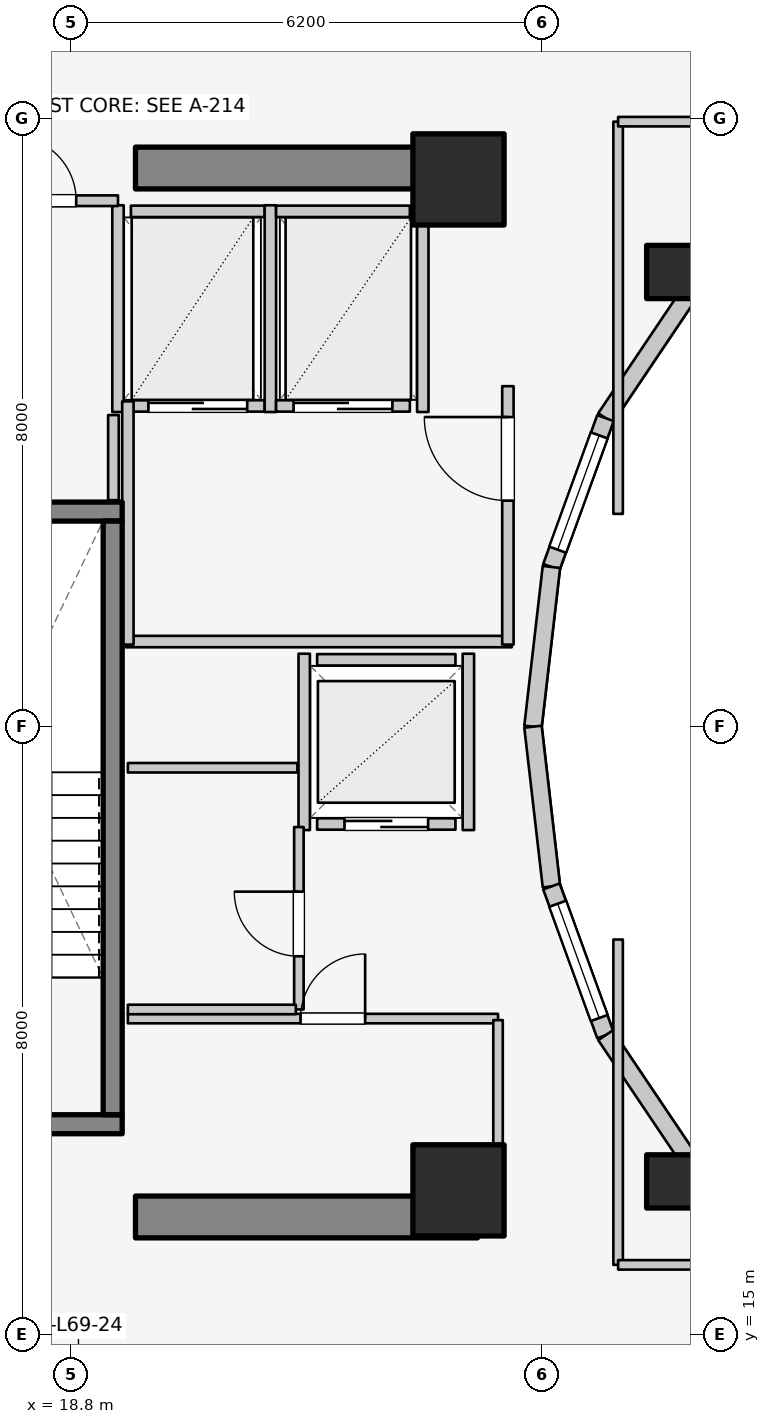
"""IFC4 building model, lengths in metres.
Left out: names, types, materials, properties, quantities, classifications, styles, units other than length and angle.
Written with IfcOpenShell. Run it as: python <this file> out.ifc"""

import sys

from ifc_helpers import new_model, si_unit, direction, frame, frame_2d, origin, origin_2d, place, context, subcontext, project, spatial, rectangle, extrude, element, fill, save


model = new_model("IFC4")
c1 = context("Model", 3, precision=1e-05, world=origin(), true_north=direction((0.0, 1.0)))
c2 = subcontext(c1, "Body", "Model", "MODEL_VIEW")
j1 = project(units=[si_unit("LENGTHUNIT", "METRE"), si_unit("PLANEANGLEUNIT", "RADIAN")], contexts=[c1])
p1 = place(None, origin())
s1 = spatial("IfcSite", under=j1, at=p1, CompositionType="ELEMENT")
p2 = place(p1, origin())
s2 = spatial("IfcBuilding", under=s1, at=p2, CompositionType="ELEMENT")
p3 = place(p2, frame((0.0, 0.0, 226.4)))
s3 = spatial("IfcBuildingStorey", under=s2, at=p3, CompositionType="ELEMENT", Elevation=226.4)
for number, where, z_axis, x_axis in (
    (1, (19.65, 16.55, 0.0), (0.0, 0.0, 1.0), (1.0, 0.0, 0.0)),
    (2, (19.65, 30.35, 0.0), (0.0, 0.0, 1.0), (1.0, 0.0, 0.0)),
):
    element("IfcWall", number, at=place(p3, frame(where, z_axis=z_axis, x_axis=x_axis)), inside=s3, PredefinedType="SHEAR", context=c2, shape_type="SweptSolid", body=[
        extrude(rectangle(XDim=4.5, YDim=0.55, at=frame_2d((2.25, 0.0))), origin(), (0.0, 0.0, 1.0), 3.1),
    ])
p4 = place(p3, frame((16.105, 17.77, 0.0), z_axis=(0.0, 0.0, 1.0), x_axis=(1.0, 0.0, 0.0)))
e3 = element("IfcWall", 3, at=p4, inside=s3, PredefinedType="SOLIDWALL", context=c2, shape_type="SweptSolid", body=[
    extrude(rectangle(XDim=3.37, YDim=0.25, at=frame_2d((1.685, 0.0))), origin(), (0.0, 0.0, 1.0), 3.1),
])
p5 = place(p4, frame((1.135, 0.0, 0.0)))
e4 = element("IfcOpeningElement", 4, at=p5, cuts=e3, PredefinedType="OPENING", context=c2, shape_type="SweptSolid", body=[
    extrude(rectangle(XDim=1.1, YDim=2.1, at=frame_2d((0.55, 1.05))), frame((0.0, 0.135, 0.0), z_axis=(0.0, -1.0, 0.0), x_axis=(1.0, 0.0, 0.0)), (0.0, 0.0, 1.0), 0.27),
])
p6 = place(p3, frame((16.105, 25.83, 0.0), z_axis=(0.0, 0.0, 1.0), x_axis=(1.0, 0.0, 0.0)))
e5 = element("IfcWall", 5, at=p6, inside=s3, PredefinedType="SOLIDWALL", context=c2, shape_type="SweptSolid", body=[
    extrude(rectangle(XDim=3.37, YDim=0.25, at=frame_2d((1.685, 0.0))), origin(), (0.0, 0.0, 1.0), 3.1),
])
p7 = place(p3, frame((19.35, 17.895, 0.0), z_axis=(0.0, 0.0, 1.0), x_axis=(0.0, 1.0, 0.0)))
e6 = element("IfcWall", 6, at=p7, inside=s3, PredefinedType="SOLIDWALL", context=c2, shape_type="SweptSolid", body=[
    extrude(rectangle(XDim=7.81, YDim=0.25, at=frame_2d((3.905, 0.0))), origin(), (0.0, 0.0, 1.0), 3.1),
])
for number, where, z_axis, x_axis in (
    (7, (23.9, 16.9, 0.0), (0.0, 0.0, 1.0), (1.0, 0.0, 0.0)),
    (8, (23.9, 30.2, 0.0), (0.0, 0.0, 1.0), (1.0, 0.0, 0.0)),
):
    element("IfcColumn", number, at=place(p3, frame(where, z_axis=z_axis, x_axis=x_axis)), inside=s3, PredefinedType="COLUMN", context=c2, shape_type="SweptSolid", body=[
        extrude(rectangle(XDim=1.2, YDim=1.2, at=origin_2d()), origin(), (0.0, 0.0, 1.0), 3.1),
    ])
for number, where, z_axis, x_axis in (
    (9, (26.725, 28.982, 0.0), (0.0, 0.0, 1.0), (1.0, 0.0, 0.0)),
    (10, (26.725, 17.018, 0.0), (0.0, 0.0, 1.0), (1.0, 0.0, 0.0)),
):
    element("IfcColumn", number, at=place(p3, frame(where, z_axis=z_axis, x_axis=x_axis)), inside=s3, PredefinedType="COLUMN", context=c2, shape_type="SweptSolid", body=[
        extrude(rectangle(XDim=0.7, YDim=0.7, at=origin_2d()), origin(), (0.0, 0.0, 1.0), 3.1),
    ])
p8 = place(p3, frame((28.44, 30.032, 0.0), z_axis=(0.0, 0.0, 1.0), x_axis=(-0.752576694707, -0.658504607869, 0.0)))
e11 = element("IfcWall", 11, at=p8, inside=s3, PredefinedType="STANDARD", context=c2, shape_type="SweptSolid", body=[
    extrude(rectangle(XDim=1.959, YDim=0.23, at=frame_2d((0.98, 0.0))), origin(), (0.0, 0.0, 1.0), 2.16),
])
p9 = place(p3, frame((26.965, 28.742, 0.0), z_axis=(0.0, 0.0, 1.0), x_axis=(-0.558197800898, -0.829707909492, 0.0)))
e12 = element("IfcWall", 12, at=p9, inside=s3, PredefinedType="STANDARD", context=c2, shape_type="SweptSolid", body=[
    extrude(rectangle(XDim=2.027, YDim=0.23, at=frame_2d((1.013, 0.0))), origin(), (0.0, 0.0, 1.0), 2.16),
])
p10 = place(p3, frame((25.834, 27.06, 0.0), z_axis=(0.0, 0.0, 1.0), x_axis=(-0.341423187295, -0.93990968033, 0.0)))
e13 = element("IfcWall", 13, at=p10, inside=s3, PredefinedType="STANDARD", context=c2, shape_type="SweptSolid", body=[
    extrude(rectangle(XDim=2.084, YDim=0.23, at=frame_2d((1.042, 0.0))), origin(), (0.0, 0.0, 1.0), 2.84),
])
p11 = place(p10, frame((0.242, 0.0, 0.85)))
e14 = element("IfcOpeningElement", 14, at=p11, cuts=e13, PredefinedType="OPENING", context=c2, shape_type="SweptSolid", body=[
    extrude(rectangle(XDim=1.6, YDim=1.65, at=frame_2d((0.8, 0.825))), frame((0.0, 0.125, 0.0), z_axis=(0.0, -1.0, 0.0), x_axis=(1.0, 0.0, 0.0)), (0.0, 0.0, 1.0), 0.25),
])
for number, where, z_axis, x_axis in (
    (15, (25.123, 25.102, 0.0), (0.0, 0.0, 1.0), (-0.115, -0.993, 0.0)),
    (16, (24.88, 23.0, 0.0), (0.0, 0.0, 1.0), (0.115, -0.993, 0.0)),
):
    element("IfcWall", number, at=place(p3, frame(where, z_axis=z_axis, x_axis=x_axis)), inside=s3, PredefinedType="STANDARD", context=c2, shape_type="SweptSolid", body=[
        extrude(rectangle(XDim=2.115, YDim=0.23, at=frame_2d((1.058, 0.0))), origin(), (0.0, 0.0, 1.0), 2.84),
    ])
p12 = place(p3, frame((25.123, 20.898, 0.0), z_axis=(0.0, 0.0, 1.0), x_axis=(0.341423187295, -0.93990968033, 0.0)))
e17 = element("IfcWall", 17, at=p12, inside=s3, PredefinedType="STANDARD", context=c2, shape_type="SweptSolid", body=[
    extrude(rectangle(XDim=2.084, YDim=0.23, at=frame_2d((1.042, 0.0))), origin(), (0.0, 0.0, 1.0), 2.84),
])
p13 = place(p12, frame((0.242, 0.0, 0.85)))
e18 = element("IfcOpeningElement", 18, at=p13, cuts=e17, PredefinedType="OPENING", context=c2, shape_type="SweptSolid", body=[
    extrude(rectangle(XDim=1.6, YDim=1.65, at=frame_2d((0.8, 0.825))), frame((0.0, 0.125, 0.0), z_axis=(0.0, -1.0, 0.0), x_axis=(1.0, 0.0, 0.0)), (0.0, 0.0, 1.0), 0.25),
])
p14 = place(p3, frame((25.834, 18.94, 0.0), z_axis=(0.0, 0.0, 1.0), x_axis=(0.558197800898, -0.829707909492, 0.0)))
e19 = element("IfcWall", 19, at=p14, inside=s3, PredefinedType="STANDARD", context=c2, shape_type="SweptSolid", body=[
    extrude(rectangle(XDim=2.027, YDim=0.23, at=frame_2d((1.013, 0.0))), origin(), (0.0, 0.0, 1.0), 2.16),
])
p15 = place(p3, frame((26.965, 17.258, 0.0), z_axis=(0.0, 0.0, 1.0), x_axis=(0.752576694707, -0.658504607869, 0.0)))
e20 = element("IfcWall", 20, at=p15, inside=s3, PredefinedType="STANDARD", context=c2, shape_type="SweptSolid", body=[
    extrude(rectangle(XDim=1.959, YDim=0.23, at=frame_2d((0.98, 0.0))), origin(), (0.0, 0.0, 1.0), 2.16),
])
p16 = place(p3, frame((22.04, 21.72, 0.0), z_axis=(0.0, 0.0, 1.0), x_axis=(1.0, 0.0, 0.0)))
e21 = element("IfcWall", 21, at=p16, inside=s3, PredefinedType="SOLIDWALL", context=c2, shape_type="SweptSolid", body=[
    extrude(rectangle(XDim=1.82, YDim=0.15, at=frame_2d((0.91, 0.0))), origin(), (0.0, 0.0, 1.0), 2.12),
])
p17 = place(p16, frame((0.36, 0.0, 0.0)))
e22 = element("IfcOpeningElement", 22, at=p17, cuts=e21, PredefinedType="OPENING", context=c2, shape_type="SweptSolid", body=[
    extrude(rectangle(XDim=1.1, YDim=2.1, at=frame_2d((0.55, 1.05))), frame((0.0, 0.085, 0.0), z_axis=(0.0, -1.0, 0.0), x_axis=(1.0, 0.0, 0.0)), (0.0, 0.0, 1.0), 0.17),
])
p18 = place(p3, frame((22.04, 23.88, 0.0), z_axis=(0.0, 0.0, 1.0), x_axis=(1.0, 0.0, 0.0)))
e23 = element("IfcWall", 23, at=p18, inside=s3, PredefinedType="SOLIDWALL", context=c2, shape_type="SweptSolid", body=[
    extrude(rectangle(XDim=1.82, YDim=0.15, at=frame_2d((0.91, 0.0))), origin(), (0.0, 0.0, 1.0), 2.12),
])
p19 = place(p3, frame((21.87, 21.64, 0.0), z_axis=(0.0, 0.0, 1.0), x_axis=(0.0, 1.0, 0.0)))
e24 = element("IfcWall", 24, at=p19, inside=s3, PredefinedType="SOLIDWALL", context=c2, shape_type="SweptSolid", body=[
    extrude(rectangle(XDim=2.32, YDim=0.15, at=frame_2d((1.16, 0.0))), origin(), (0.0, 0.0, 1.0), 2.855),
])
p20 = place(p3, frame((24.03, 21.64, 0.0), z_axis=(0.0, 0.0, 1.0), x_axis=(0.0, 1.0, 0.0)))
e25 = element("IfcWall", 25, at=p20, inside=s3, PredefinedType="SOLIDWALL", context=c2, shape_type="SweptSolid", body=[
    extrude(rectangle(XDim=2.32, YDim=0.15, at=frame_2d((1.16, 0.0))), origin(), (0.0, 0.0, 1.0), 2.12),
])
p21 = place(p3, frame((19.59, 27.22, 0.0), z_axis=(0.0, 0.0, 1.0), x_axis=(1.0, 0.0, 0.0)))
e26 = element("IfcWall", 26, at=p21, inside=s3, PredefinedType="SOLIDWALL", context=c2, shape_type="SweptSolid", body=[
    extrude(rectangle(XDim=1.76, YDim=0.15, at=frame_2d((0.88, 0.0))), origin(), (0.0, 0.0, 1.0), 2.855),
])
p22 = place(p21, frame((0.23, 0.0, 0.0)))
e27 = element("IfcOpeningElement", 27, at=p22, cuts=e26, PredefinedType="OPENING", context=c2, shape_type="SweptSolid", body=[
    extrude(rectangle(XDim=1.3, YDim=2.1, at=frame_2d((0.65, 1.05))), frame((0.0, 0.085, 0.0), z_axis=(0.0, -1.0, 0.0), x_axis=(1.0, 0.0, 0.0)), (0.0, 0.0, 1.0), 0.17),
])
p23 = place(p3, frame((19.59, 29.78, 0.0), z_axis=(0.0, 0.0, 1.0), x_axis=(1.0, 0.0, 0.0)))
e28 = element("IfcWall", 28, at=p23, inside=s3, PredefinedType="SOLIDWALL", context=c2, shape_type="SweptSolid", body=[
    extrude(rectangle(XDim=1.76, YDim=0.15, at=frame_2d((0.88, 0.0))), origin(), (0.0, 0.0, 1.0), 2.855),
])
for number, where, z_axis, x_axis in (
    (29, (19.42, 27.14, 0.0), (0.0, 0.0, 1.0), (0.0, 1.0, 0.0)),
    (30, (21.425, 27.14, 0.0), (0.0, 0.0, 1.0), (0.0, 1.0, 0.0)),
):
    element("IfcWall", number, at=place(p3, frame(where, z_axis=z_axis, x_axis=x_axis)), inside=s3, PredefinedType="SOLIDWALL", context=c2, shape_type="SweptSolid", body=[
        extrude(rectangle(XDim=2.72, YDim=0.15, at=frame_2d((1.36, 0.0))), origin(), (0.0, 0.0, 1.0), 2.855),
    ])
p24 = place(p3, frame((21.5, 27.22, 0.0), z_axis=(0.0, 0.0, 1.0), x_axis=(1.0, 0.0, 0.0)))
e31 = element("IfcWall", 31, at=p24, inside=s3, PredefinedType="SOLIDWALL", context=c2, shape_type="SweptSolid", body=[
    extrude(rectangle(XDim=1.76, YDim=0.15, at=frame_2d((0.88, 0.0))), origin(), (0.0, 0.0, 1.0), 2.855),
])
p25 = place(p24, frame((0.23, 0.0, 0.0)))
e32 = element("IfcOpeningElement", 32, at=p25, cuts=e31, PredefinedType="OPENING", context=c2, shape_type="SweptSolid", body=[
    extrude(rectangle(XDim=1.3, YDim=2.1, at=frame_2d((0.65, 1.05))), frame((0.0, 0.085, 0.0), z_axis=(0.0, -1.0, 0.0), x_axis=(1.0, 0.0, 0.0)), (0.0, 0.0, 1.0), 0.17),
])
p26 = place(p3, frame((21.5, 29.78, 0.0), z_axis=(0.0, 0.0, 1.0), x_axis=(1.0, 0.0, 0.0)))
e33 = element("IfcWall", 33, at=p26, inside=s3, PredefinedType="SOLIDWALL", context=c2, shape_type="SweptSolid", body=[
    extrude(rectangle(XDim=1.76, YDim=0.15, at=frame_2d((0.88, 0.0))), origin(), (0.0, 0.0, 1.0), 2.855),
])
p27 = place(p3, frame((23.43, 27.14, 0.0), z_axis=(0.0, 0.0, 1.0), x_axis=(0.0, 1.0, 0.0)))
e34 = element("IfcWall", 34, at=p27, inside=s3, PredefinedType="SOLIDWALL", context=c2, shape_type="SweptSolid", body=[
    extrude(rectangle(XDim=2.72, YDim=0.15, at=frame_2d((1.36, 0.0))), origin(), (0.0, 0.0, 1.0), 2.855),
])
p28 = place(p3, frame((19.52, 24.12, 0.0), z_axis=(0.0, 0.0, 1.0), x_axis=(1.0, 0.0, 0.0)))
e35 = element("IfcWall", 35, at=p28, inside=s3, PredefinedType="PARTITIONING", context=c2, shape_type="SweptSolid", body=[
    extrude(rectangle(XDim=5.08, YDim=0.15, at=frame_2d((2.54, 0.0))), origin(), (0.0, 0.0, 1.0), 2.12),
])
p29 = place(p3, frame((19.55, 24.08, 0.0), z_axis=(0.0, 0.0, 1.0), x_axis=(0.0, 1.0, 0.0)))
e36 = element("IfcWall", 36, at=p29, inside=s3, PredefinedType="PARTITIONING", context=c2, shape_type="SweptSolid", body=[
    extrude(rectangle(XDim=3.2, YDim=0.15, at=frame_2d((1.6, 0.0))), origin(), (0.0, 0.0, 1.0), 2.855),
])
p30 = place(p3, frame((24.55, 24.08, 0.0), z_axis=(0.0, 0.0, 1.0), x_axis=(0.0, 1.0, 0.0)))
e37 = element("IfcWall", 37, at=p30, inside=s3, PredefinedType="PARTITIONING", context=c2, shape_type="SweptSolid", body=[
    extrude(rectangle(XDim=3.4, YDim=0.15, at=frame_2d((1.7, 0.0))), origin(), (0.0, 0.0, 1.0), 2.855),
])
p31 = place(p30, frame((1.894, 0.0, 0.0)))
e38 = element("IfcOpeningElement", 38, at=p31, cuts=e37, PredefinedType="OPENING", context=c2, shape_type="SweptSolid", body=[
    extrude(rectangle(XDim=1.1, YDim=2.1, at=frame_2d((0.55, 1.05))), frame((0.0, 0.085, 0.0), z_axis=(0.0, -1.0, 0.0), x_axis=(1.0, 0.0, 0.0)), (0.0, 0.0, 1.0), 0.17),
])
p32 = place(p3, frame((19.55, 19.16, 0.0), z_axis=(0.0, 0.0, 1.0), x_axis=(1.0, 0.0, 0.0)))
e39 = element("IfcWall", 39, at=p32, inside=s3, PredefinedType="PARTITIONING", context=c2, shape_type="SweptSolid", body=[
    extrude(rectangle(XDim=4.87, YDim=0.125, at=frame_2d((2.435, 0.0))), origin(), (0.0, 0.0, 1.0), 2.12),
])
p33 = place(p32, frame((2.272, 0.0, 0.0)))
e40 = element("IfcOpeningElement", 40, at=p33, cuts=e39, PredefinedType="OPENING", context=c2, shape_type="SweptSolid", body=[
    extrude(rectangle(XDim=0.85, YDim=2.05, at=frame_2d((0.425, 1.025))), frame((0.0, 0.073, 0.0), z_axis=(0.0, -1.0, 0.0), x_axis=(1.0, 0.0, 0.0)), (0.0, 0.0, 1.0), 0.145),
])
p34 = place(p3, frame((24.42, 17.1, 0.0), z_axis=(0.0, 0.0, 1.0), x_axis=(0.0, 1.0, 0.0)))
e41 = element("IfcWall", 41, at=p34, inside=s3, PredefinedType="PARTITIONING", context=c2, shape_type="SweptSolid", body=[
    extrude(rectangle(XDim=2.04, YDim=0.125, at=frame_2d((1.02, 0.0))), origin(), (0.0, 0.0, 1.0), 2.232),
])
p35 = place(p3, frame((21.8, 19.28, 0.0), z_axis=(0.0, 0.0, 1.0), x_axis=(0.0, 1.0, 0.0)))
e42 = element("IfcWall", 42, at=p35, inside=s3, PredefinedType="PARTITIONING", context=c2, shape_type="SweptSolid", body=[
    extrude(rectangle(XDim=2.4, YDim=0.125, at=frame_2d((1.2, 0.0))), origin(), (0.0, 0.0, 1.0), 2.855),
])
p36 = place(p35, frame((0.7, 0.0, 0.0)))
e43 = element("IfcOpeningElement", 43, at=p36, cuts=e42, PredefinedType="OPENING", context=c2, shape_type="SweptSolid", body=[
    extrude(rectangle(XDim=0.85, YDim=2.05, at=frame_2d((0.425, 1.025))), frame((0.0, 0.073, 0.0), z_axis=(0.0, -1.0, 0.0), x_axis=(1.0, 0.0, 0.0)), (0.0, 0.0, 1.0), 0.145),
])
p37 = place(p3, frame((19.55, 19.28, 0.0), z_axis=(0.0, 0.0, 1.0), x_axis=(1.0, 0.0, 0.0)))
e44 = element("IfcWall", 44, at=p37, inside=s3, PredefinedType="PARTITIONING", context=c2, shape_type="SweptSolid", body=[
    extrude(rectangle(XDim=2.21, YDim=0.125, at=frame_2d((1.105, 0.0))), origin(), (0.0, 0.0, 1.0), 2.12),
])
p38 = place(p3, frame((19.55, 22.46, 0.0), z_axis=(0.0, 0.0, 1.0), x_axis=(1.0, 0.0, 0.0)))
e45 = element("IfcWall", 45, at=p38, inside=s3, PredefinedType="PARTITIONING", context=c2, shape_type="SweptSolid", body=[
    extrude(rectangle(XDim=2.23, YDim=0.125, at=frame_2d((1.115, 0.0))), origin(), (0.0, 0.0, 1.0), 2.855),
])
p39 = place(p3, frame((17.52, 29.92, 0.0), z_axis=(0.0, 0.0, 1.0), x_axis=(1.0, 0.0, 0.0)))
e46 = element("IfcWall", 46, at=p39, inside=s3, PredefinedType="PLUMBINGWALL", context=c2, shape_type="SweptSolid", body=[
    extrude(rectangle(XDim=1.9, YDim=0.14, at=frame_2d((0.95, 0.0))), origin(), (0.0, 0.0, 1.0), 2.855),
])
p40 = place(p39, frame((0.5, 0.0, 0.0)))
e47 = element("IfcOpeningElement", 47, at=p40, cuts=e46, PredefinedType="OPENING", context=c2, shape_type="SweptSolid", body=[
    extrude(rectangle(XDim=0.85, YDim=2.05, at=frame_2d((0.425, 1.025))), frame((0.0, 0.08, 0.0), z_axis=(0.0, -1.0, 0.0), x_axis=(1.0, 0.0, 0.0)), (0.0, 0.0, 1.0), 0.16),
])
p41 = place(p3, frame((19.36, 25.98, 0.0), z_axis=(0.0, 0.0, 1.0), x_axis=(0.0, 1.0, 0.0)))
e48 = element("IfcWall", 48, at=p41, inside=s3, PredefinedType="PLUMBINGWALL", context=c2, shape_type="SweptSolid", body=[
    extrude(rectangle(XDim=1.12, YDim=0.14, at=frame_2d((0.56, 0.0))), origin(), (0.0, 0.0, 1.0), 2.855),
])
p42 = place(p3, frame((28.45, 30.015, 0.0), z_axis=(0.0, 0.0, 1.0), x_axis=(-0.523992004803, 0.851723182086, 0.0)))
e49 = element("IfcWall", 49, at=p42, inside=s3, PredefinedType="PARTITIONING", context=c2, shape_type="SweptSolid", body=[
    extrude(rectangle(XDim=3.101, YDim=0.125, at=frame_2d((1.551, 0.0))), origin(), (0.0, 0.0, 1.0), 2.376),
])
p43 = place(p3, frame((26.0, 25.8, 0.0), z_axis=(0.0, 0.0, 1.0), x_axis=(0.0, 1.0, 0.0)))
e50 = element("IfcWall", 50, at=p43, inside=s3, PredefinedType="PARTITIONING", context=c2, shape_type="SweptSolid", body=[
    extrude(rectangle(XDim=5.16, YDim=0.125, at=frame_2d((2.58, 0.0))), origin(), (0.0, 0.0, 1.0), 2.232),
])
p44 = place(p3, frame((26.0, 30.96, 0.0), z_axis=(0.0, 0.0, 1.0), x_axis=(1.0, 0.0, 0.0)))
e51 = element("IfcWall", 51, at=p44, inside=s3, PredefinedType="PARTITIONING", context=c2, shape_type="SweptSolid", body=[
    extrude(rectangle(XDim=2.6, YDim=0.125, at=frame_2d((1.3, 0.0))), origin(), (0.0, 0.0, 1.0), 2.376),
])
p45 = place(p3, frame((26.0, 15.92, 0.0), z_axis=(0.0, 0.0, 1.0), x_axis=(0.0, 1.0, 0.0)))
e52 = element("IfcWall", 52, at=p45, inside=s3, PredefinedType="PARTITIONING", context=c2, shape_type="SweptSolid", body=[
    extrude(rectangle(XDim=4.28, YDim=0.125, at=frame_2d((2.14, 0.0))), origin(), (0.0, 0.0, 1.0), 2.232),
])
p46 = place(p3, frame((26.0, 15.92, 0.0), z_axis=(0.0, 0.0, 1.0), x_axis=(1.0, 0.0, 0.0)))
e53 = element("IfcWall", 53, at=p46, inside=s3, PredefinedType="PARTITIONING", context=c2, shape_type="SweptSolid", body=[
    extrude(rectangle(XDim=2.6, YDim=0.125, at=frame_2d((1.3, 0.0))), origin(), (0.0, 0.0, 1.0), 2.232),
])
p47 = place(p11, origin())
e54 = element("IfcWindow", 54, at=p47, inside=s3, PartitioningType="SINGLE_PANEL", PredefinedType="WINDOW", context=c2, shape_type="SweptSolid", body=[
    extrude(rectangle(XDim=1.6, YDim=1.65, at=frame_2d((0.8, 0.825))), frame((0.0, 0.03, 0.0), z_axis=(0.0, -1.0, 0.0), x_axis=(1.0, 0.0, 0.0)), (0.0, 0.0, 1.0), 0.06),
])
fill(e14, e54)
p48 = place(p13, origin())
e55 = element("IfcWindow", 55, at=p48, inside=s3, PartitioningType="SINGLE_PANEL", PredefinedType="WINDOW", context=c2, shape_type="SweptSolid", body=[
    extrude(rectangle(XDim=1.6, YDim=1.65, at=frame_2d((0.8, 0.825))), frame((0.0, 0.03, 0.0), z_axis=(0.0, -1.0, 0.0), x_axis=(1.0, 0.0, 0.0)), (0.0, 0.0, 1.0), 0.06),
])
fill(e18, e55)
p49 = place(p17, origin())
e56 = element("IfcDoor", 56, at=p49, inside=s3, OperationType="DOUBLE_DOOR_SLIDING", PredefinedType="DOOR", context=c2, shape_type="SweptSolid", body=[
    extrude(rectangle(XDim=1.1, YDim=2.1, at=frame_2d((0.55, 1.05))), frame((0.0, 0.025, 0.0), z_axis=(0.0, -1.0, 0.0), x_axis=(1.0, 0.0, 0.0)), (0.0, 0.0, 1.0), 0.05),
])
fill(e22, e56)
p50 = place(p22, origin())
e57 = element("IfcDoor", 57, at=p50, inside=s3, OperationType="DOUBLE_DOOR_SLIDING", PredefinedType="DOOR", context=c2, shape_type="SweptSolid", body=[
    extrude(rectangle(XDim=1.3, YDim=2.1, at=frame_2d((0.65, 1.05))), frame((0.0, 0.025, 0.0), z_axis=(0.0, -1.0, 0.0), x_axis=(1.0, 0.0, 0.0)), (0.0, 0.0, 1.0), 0.05),
])
fill(e27, e57)
p51 = place(p25, origin())
e58 = element("IfcDoor", 58, at=p51, inside=s3, OperationType="DOUBLE_DOOR_SLIDING", PredefinedType="DOOR", context=c2, shape_type="SweptSolid", body=[
    extrude(rectangle(XDim=1.3, YDim=2.1, at=frame_2d((0.65, 1.05))), frame((0.0, 0.025, 0.0), z_axis=(0.0, -1.0, 0.0), x_axis=(1.0, 0.0, 0.0)), (0.0, 0.0, 1.0), 0.05),
])
fill(e32, e58)
p52 = place(p31, origin())
e59 = element("IfcDoor", 59, at=p52, inside=s3, OperationType="SINGLE_SWING_RIGHT", PredefinedType="DOOR", context=c2, shape_type="SweptSolid", body=[
    extrude(rectangle(XDim=1.1, YDim=2.1, at=frame_2d((0.55, 1.05))), frame((0.0, 0.025, 0.0), z_axis=(0.0, -1.0, 0.0), x_axis=(1.0, 0.0, 0.0)), (0.0, 0.0, 1.0), 0.05),
])
fill(e38, e59)
p53 = place(p33, origin())
e60 = element("IfcDoor", 60, at=p53, inside=s3, OperationType="SINGLE_SWING_RIGHT", PredefinedType="DOOR", context=c2, shape_type="SweptSolid", body=[
    extrude(rectangle(XDim=0.85, YDim=2.05, at=frame_2d((0.425, 1.025))), frame((0.0, 0.025, 0.0), z_axis=(0.0, -1.0, 0.0), x_axis=(1.0, 0.0, 0.0)), (0.0, 0.0, 1.0), 0.05),
])
fill(e40, e60)
p54 = place(p36, origin())
e61 = element("IfcDoor", 61, at=p54, inside=s3, OperationType="SINGLE_SWING_RIGHT", PredefinedType="DOOR", context=c2, shape_type="SweptSolid", body=[
    extrude(rectangle(XDim=0.85, YDim=2.05, at=frame_2d((0.425, 1.025))), frame((0.0, 0.025, 0.0), z_axis=(0.0, -1.0, 0.0), x_axis=(1.0, 0.0, 0.0)), (0.0, 0.0, 1.0), 0.05),
])
fill(e43, e61)
p55 = place(p40, origin())
e62 = element("IfcDoor", 62, at=p55, inside=s3, OperationType="SINGLE_SWING_LEFT", PredefinedType="DOOR", context=c2, shape_type="SweptSolid", body=[
    extrude(rectangle(XDim=0.85, YDim=2.05, at=frame_2d((0.425, 1.025))), frame((0.0, 0.025, 0.0), z_axis=(0.0, -1.0, 0.0), x_axis=(1.0, 0.0, 0.0)), (0.0, 0.0, 1.0), 0.05),
])
fill(e47, e62)
save(model, sys.argv[1])
